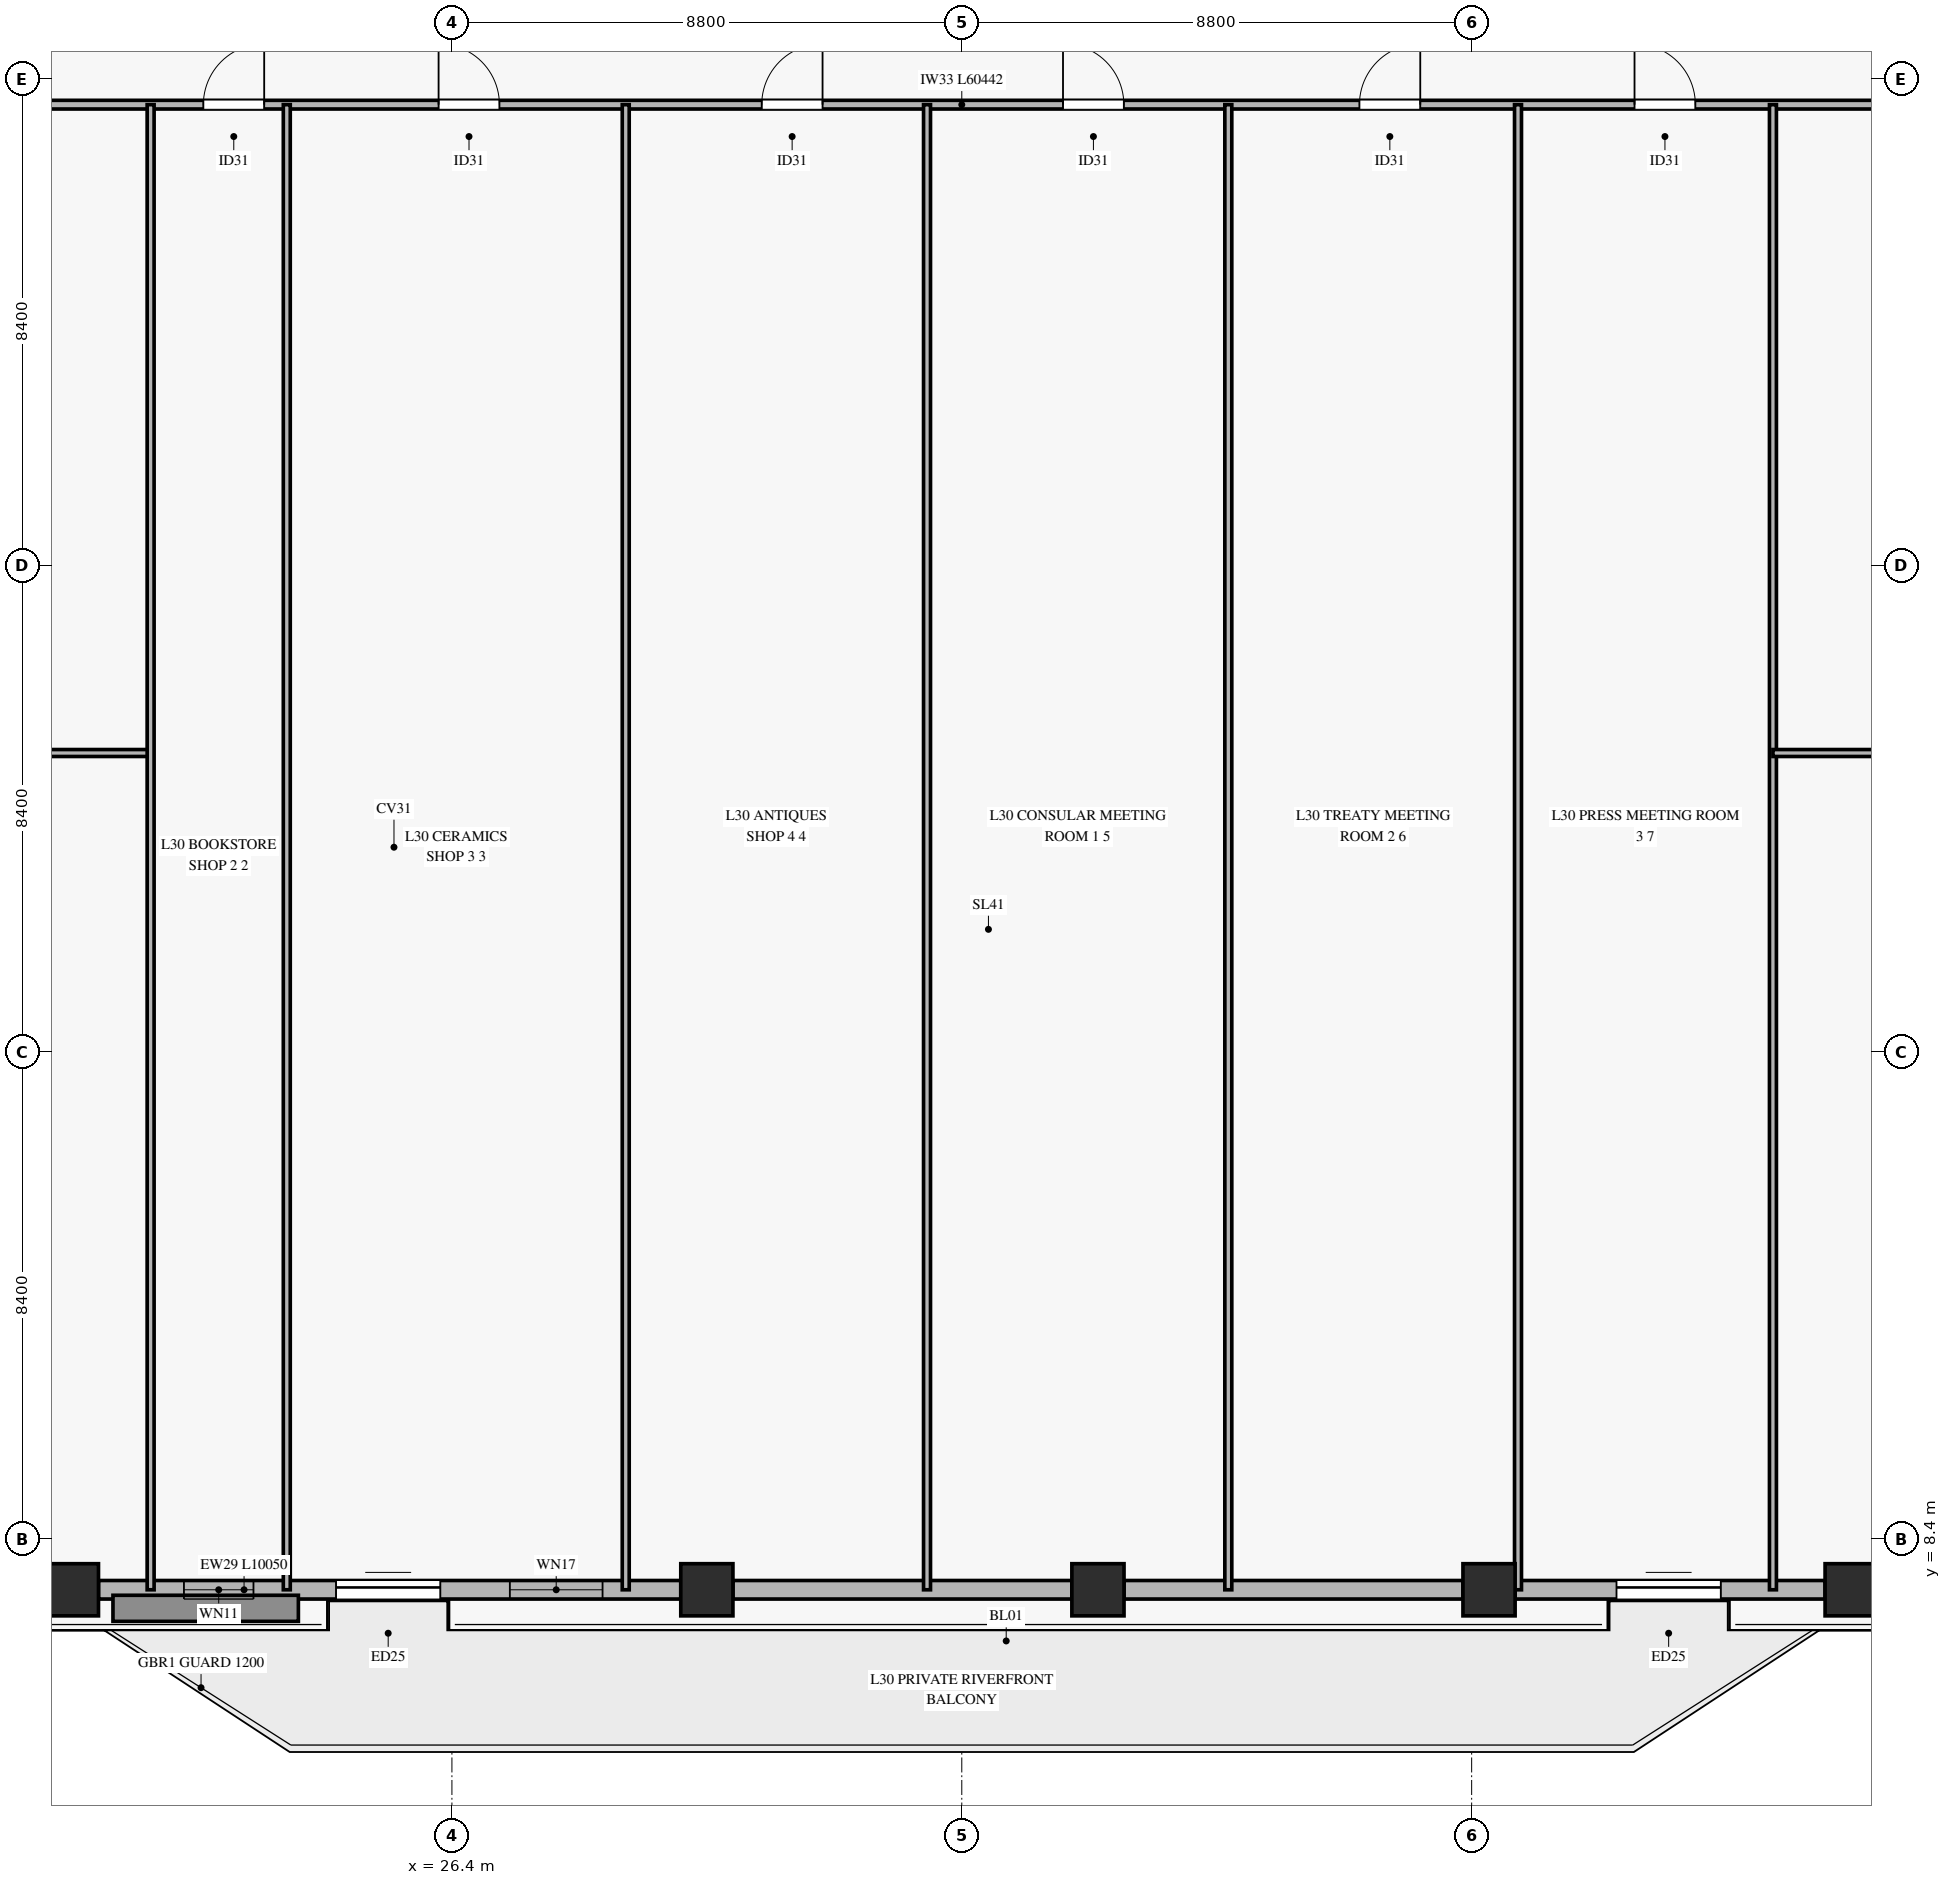
"""IFC4 building model, lengths in metres.
Left out: names, types, materials, properties, quantities, classifications, styles, units other than length and angle.
Written with IfcOpenShell. Run it as: python <this file> out.ifc"""

import sys

from ifc_helpers import new_model, si_unit, direction, frame, frame_2d, origin, origin_2d, place, context, subcontext, project, spatial, rectangle, hollow_rectangle, extrude, source, transform, mapped, element, fill, save


model = new_model("IFC4")
c1 = context("Model", 3, precision=1e-05, world=origin(), true_north=direction((0.0, 1.0)))
c2 = subcontext(c1, "Body", "Model", "MODEL_VIEW")
j1 = project(units=[si_unit("LENGTHUNIT", "METRE"), si_unit("PLANEANGLEUNIT", "RADIAN")], contexts=[c1])
p1 = place(None, origin())
s1 = spatial("IfcSite", under=j1, at=p1, CompositionType="ELEMENT")
p2 = place(p1, origin())
s2 = spatial("IfcBuilding", under=s1, at=p2, CompositionType="ELEMENT")
p3 = place(p2, frame((0.0, 0.0, 123.1)))
s3 = spatial("IfcBuildingStorey", under=s2, at=p3, CompositionType="ELEMENT", Elevation=123.1)
m1 = source(origin(), c2, "Body", "SweptSolid", [
    extrude(hollow_rectangle(XDim=0.9, YDim=0.9, WallThickness=0.04, at=origin_2d()), origin(), (0.0, 0.0, 1.0), 3.68),
])
for number, where, z_axis, x_axis in (
    (1, (19.85, 7.518, 0.0), (0.0, 0.0, 1.0), (1.0, 0.0, 0.0)),
    (2, (30.8, 7.518, 0.0), (0.0, 0.0, 1.0), (1.0, 0.0, 0.0)),
    (3, (37.55, 7.518, 0.0), (0.0, 0.0, 1.0), (1.0, 0.0, 0.0)),
    (4, (44.3, 7.518, 0.0), (0.0, 0.0, 1.0), (1.0, 0.0, 0.0)),
    (5, (50.55, 7.518, 0.0), (0.0, 0.0, 1.0), (1.0, 0.0, 0.0)),
):
    element("IfcColumn", number, at=place(p3, frame(where, z_axis=z_axis, x_axis=x_axis)), inside=s3, PredefinedType="COLUMN", context=c2, shape_type="MappedRepresentation", body=[
        mapped(m1, transform((0.0, 0.0, 0.0), x_axis=(1.0, 0.0, 0.0), y_axis=(0.0, 1.0, 0.0), z_axis=(0.0, 0.0, 1.0), scale=1.0)),
    ])
p4 = place(p3, frame((20.3, 7.518, 0.0), z_axis=(0.0, 0.0, 1.0), x_axis=(1.0, 0.0, 0.0)))
e6 = element("IfcWall", 6, at=p4, inside=s3, PredefinedType="SOLIDWALL", context=c2, shape_type="SweptSolid", body=[
    extrude(rectangle(XDim=10.05, YDim=0.32, at=frame_2d((5.025, 0.0))), origin(), (0.0, 0.0, 1.0), 3.16),
])
p5 = place(p4, frame((4.1, 0.0, 0.0)))
e7 = element("IfcOpeningElement", 7, at=p5, cuts=e6, PredefinedType="OPENING", context=c2, shape_type="SweptSolid", body=[
    extrude(rectangle(XDim=1.8, YDim=2.25, at=frame_2d((0.9, 1.125))), frame((0.0, 0.17, 0.0), z_axis=(0.0, -1.0, 0.0), x_axis=(1.0, 0.0, 0.0)), (0.0, 0.0, 1.0), 0.34),
])
p6 = place(p4, frame((1.475, 0.0, 0.45)))
e8 = element("IfcOpeningElement", 8, at=p6, cuts=e6, PredefinedType="OPENING", context=c2, shape_type="SweptSolid", body=[
    extrude(rectangle(XDim=1.2, YDim=2.0, at=frame_2d((0.6, 1.0))), frame((0.0, 0.17, 0.0), z_axis=(0.0, -1.0, 0.0), x_axis=(1.0, 0.0, 0.0)), (0.0, 0.0, 1.0), 0.34),
])
p7 = place(p4, frame((7.1, 0.0, 0.45)))
e9 = element("IfcOpeningElement", 9, at=p7, cuts=e6, PredefinedType="OPENING", context=c2, shape_type="SweptSolid", body=[
    extrude(rectangle(XDim=1.6, YDim=2.0, at=frame_2d((0.8, 1.0))), frame((0.0, 0.17, 0.0), z_axis=(0.0, -1.0, 0.0), x_axis=(1.0, 0.0, 0.0)), (0.0, 0.0, 1.0), 0.34),
])
for number, where, z_axis, x_axis in (
    (10, (31.25, 7.518, 0.0), (0.0, 0.0, 1.0), (1.0, 0.0, 0.0)),
    (11, (38.0, 7.518, 0.0), (0.0, 0.0, 1.0), (1.0, 0.0, 0.0)),
):
    element("IfcWall", number, at=place(p3, frame(where, z_axis=z_axis, x_axis=x_axis)), inside=s3, PredefinedType="SOLIDWALL", context=c2, shape_type="SweptSolid", body=[
        extrude(rectangle(XDim=5.85, YDim=0.32, at=frame_2d((2.925, 0.0))), origin(), (0.0, 0.0, 1.0), 3.16),
    ])
p8 = place(p3, frame((44.75, 7.518, 0.0), z_axis=(0.0, 0.0, 1.0), x_axis=(1.0, 0.0, 0.0)))
e12 = element("IfcWall", 12, at=p8, inside=s3, PredefinedType="SOLIDWALL", context=c2, shape_type="SweptSolid", body=[
    extrude(rectangle(XDim=5.35, YDim=0.32, at=frame_2d((2.675, 0.0))), origin(), (0.0, 0.0, 1.0), 3.16),
])
p9 = place(p8, frame((1.75, 0.0, 0.0)))
e13 = element("IfcOpeningElement", 13, at=p9, cuts=e12, PredefinedType="OPENING", context=c2, shape_type="SweptSolid", body=[
    extrude(rectangle(XDim=1.8, YDim=2.25, at=frame_2d((0.9, 1.125))), frame((0.0, 0.17, 0.0), z_axis=(0.0, -1.0, 0.0), x_axis=(1.0, 0.0, 0.0)), (0.0, 0.0, 1.0), 0.34),
])
p10 = place(p3, frame((4.979, 33.15, 0.0), z_axis=(0.0, 0.0, 1.0), x_axis=(1.0, 0.0, 0.0)))
e14 = element("IfcWall", 14, at=p10, inside=s3, PredefinedType="PARTITIONING", context=c2, shape_type="SweptSolid", body=[
    extrude(rectangle(XDim=60.442, YDim=0.15, at=frame_2d((30.221, 0.0))), origin(), (0.0, 0.0, 1.0), 2.765),
])
p11 = place(p10, frame((6.774, 0.0, 0.0)))
e15 = element("IfcOpeningElement", 15, at=p11, cuts=e14, PredefinedType="OPENING", context=c2, shape_type="SweptSolid", body=[
    extrude(rectangle(XDim=1.05, YDim=2.15, at=frame_2d((0.525, 1.075))), frame((0.0, 0.085, 0.0), z_axis=(0.0, -1.0, 0.0), x_axis=(1.0, 0.0, 0.0)), (0.0, 0.0, 1.0), 0.17),
])
p12 = place(p10, frame((17.131, 0.0, 0.0)))
e16 = element("IfcOpeningElement", 16, at=p12, cuts=e14, PredefinedType="OPENING", context=c2, shape_type="SweptSolid", body=[
    extrude(rectangle(XDim=1.05, YDim=2.15, at=frame_2d((0.525, 1.075))), frame((0.0, 0.085, 0.0), z_axis=(0.0, -1.0, 0.0), x_axis=(1.0, 0.0, 0.0)), (0.0, 0.0, 1.0), 0.17),
])
p13 = place(p10, frame((21.191, 0.0, 0.0)))
e17 = element("IfcOpeningElement", 17, at=p13, cuts=e14, PredefinedType="OPENING", context=c2, shape_type="SweptSolid", body=[
    extrude(rectangle(XDim=1.05, YDim=2.15, at=frame_2d((0.525, 1.075))), frame((0.0, 0.085, 0.0), z_axis=(0.0, -1.0, 0.0), x_axis=(1.0, 0.0, 0.0)), (0.0, 0.0, 1.0), 0.17),
])
p14 = place(p10, frame((26.768, 0.0, 0.0)))
e18 = element("IfcOpeningElement", 18, at=p14, cuts=e14, PredefinedType="OPENING", context=c2, shape_type="SweptSolid", body=[
    extrude(rectangle(XDim=1.05, YDim=2.15, at=frame_2d((0.525, 1.075))), frame((0.0, 0.085, 0.0), z_axis=(0.0, -1.0, 0.0), x_axis=(1.0, 0.0, 0.0)), (0.0, 0.0, 1.0), 0.17),
])
p15 = place(p10, frame((31.968, 0.0, 0.0)))
e19 = element("IfcOpeningElement", 19, at=p15, cuts=e14, PredefinedType="OPENING", context=c2, shape_type="SweptSolid", body=[
    extrude(rectangle(XDim=1.05, YDim=2.15, at=frame_2d((0.525, 1.075))), frame((0.0, 0.085, 0.0), z_axis=(0.0, -1.0, 0.0), x_axis=(1.0, 0.0, 0.0)), (0.0, 0.0, 1.0), 0.17),
])
p16 = place(p10, frame((37.084, 0.0, 0.0)))
e20 = element("IfcOpeningElement", 20, at=p16, cuts=e14, PredefinedType="OPENING", context=c2, shape_type="SweptSolid", body=[
    extrude(rectangle(XDim=1.05, YDim=2.15, at=frame_2d((0.525, 1.075))), frame((0.0, 0.085, 0.0), z_axis=(0.0, -1.0, 0.0), x_axis=(1.0, 0.0, 0.0)), (0.0, 0.0, 1.0), 0.17),
])
p17 = place(p10, frame((41.832, 0.0, 0.0)))
e21 = element("IfcOpeningElement", 21, at=p17, cuts=e14, PredefinedType="OPENING", context=c2, shape_type="SweptSolid", body=[
    extrude(rectangle(XDim=1.05, YDim=2.15, at=frame_2d((0.525, 1.075))), frame((0.0, 0.085, 0.0), z_axis=(0.0, -1.0, 0.0), x_axis=(1.0, 0.0, 0.0)), (0.0, 0.0, 1.0), 0.17),
])
p18 = place(p10, frame((50.795, 0.0, 0.0)))
e22 = element("IfcOpeningElement", 22, at=p18, cuts=e14, PredefinedType="OPENING", context=c2, shape_type="SweptSolid", body=[
    extrude(rectangle(XDim=1.05, YDim=2.15, at=frame_2d((0.525, 1.075))), frame((0.0, 0.085, 0.0), z_axis=(0.0, -1.0, 0.0), x_axis=(1.0, 0.0, 0.0)), (0.0, 0.0, 1.0), 0.17),
])
p19 = place(p3, frame((4.979, 21.96, 0.0), z_axis=(0.0, 0.0, 1.0), x_axis=(1.0, 0.0, 0.0)))
e23 = element("IfcWall", 23, at=p19, inside=s3, PredefinedType="PARTITIONING", context=c2, shape_type="SweptSolid", body=[
    extrude(rectangle(XDim=16.221, YDim=0.12, at=frame_2d((8.11, 0.0))), origin(), (0.0, 0.0, 1.0), 2.765),
])
p20 = place(p19, frame((7.092, 0.0, 0.0)))
e24 = element("IfcOpeningElement", 24, at=p20, cuts=e23, PredefinedType="OPENING", context=c2, shape_type="SweptSolid", body=[
    extrude(rectangle(XDim=0.95, YDim=2.1, at=frame_2d((0.475, 1.05))), frame((0.0, 0.07, 0.0), z_axis=(0.0, -1.0, 0.0), x_axis=(1.0, 0.0, 0.0)), (0.0, 0.0, 1.0), 0.14),
])
for number, where, z_axis, x_axis in (
    (25, (21.2, 7.518, 0.0), (0.0, 0.0, 1.0), (0.0, 1.0, 0.0)),
    (26, (23.55, 7.518, 0.0), (0.0, 0.0, 1.0), (0.0, 1.0, 0.0)),
    (27, (29.4, 7.518, 0.0), (0.0, 0.0, 1.0), (0.0, 1.0, 0.0)),
    (28, (34.6, 7.518, 0.0), (0.0, 0.0, 1.0), (0.0, 1.0, 0.0)),
    (29, (39.8, 7.518, 0.0), (0.0, 0.0, 1.0), (0.0, 1.0, 0.0)),
    (30, (44.8, 7.518, 0.0), (0.0, 0.0, 1.0), (0.0, 1.0, 0.0)),
    (31, (49.2, 7.518, 0.0), (0.0, 0.0, 1.0), (0.0, 1.0, 0.0)),
):
    element("IfcWall", number, at=place(p3, frame(where, z_axis=z_axis, x_axis=x_axis)), inside=s3, PredefinedType="PARTITIONING", context=c2, shape_type="SweptSolid", body=[
        extrude(rectangle(XDim=25.632, YDim=0.12, at=frame_2d((12.816, 0.0))), origin(), (0.0, 0.0, 1.0), 3.165),
    ])
p21 = place(p3, frame((49.2, 21.96, 0.0), z_axis=(0.0, 0.0, 1.0), x_axis=(1.0, 0.0, 0.0)))
e32 = element("IfcWall", 32, at=p21, inside=s3, PredefinedType="PARTITIONING", context=c2, shape_type="SweptSolid", body=[
    extrude(rectangle(XDim=16.221, YDim=0.12, at=frame_2d((8.11, 0.0))), origin(), (0.0, 0.0, 1.0), 2.765),
])
p22 = place(p21, frame((6.892, 0.0, 0.0)))
e33 = element("IfcOpeningElement", 33, at=p22, cuts=e32, PredefinedType="OPENING", context=c2, shape_type="SweptSolid", body=[
    extrude(rectangle(XDim=0.95, YDim=2.1, at=frame_2d((0.475, 1.05))), frame((0.0, 0.07, 0.0), z_axis=(0.0, -1.0, 0.0), x_axis=(1.0, 0.0, 0.0)), (0.0, 0.0, 1.0), 0.14),
])
m2 = source(origin(), c2, "Body", "SweptSolid", [
    extrude(rectangle(XDim=1.8, YDim=2.25, at=frame_2d((0.9, 1.125))), frame((0.0, 0.025, 0.0), z_axis=(0.0, -1.0, 0.0), x_axis=(1.0, 0.0, 0.0)), (0.0, 0.0, 1.0), 0.05),
])
p23 = place(p5, origin())
e34 = element("IfcDoor", 34, at=p23, inside=s3, OperationType="SLIDING_TO_LEFT", PredefinedType="DOOR", context=c2, shape_type="MappedRepresentation", body=[
    mapped(m2, transform((0.0, 0.0, 0.0), x_axis=(1.0, 0.0, 0.0), y_axis=(0.0, 1.0, 0.0), z_axis=(0.0, 0.0, 1.0), scale=1.0)),
])
fill(e7, e34)
m3 = source(origin(), c2, "Body", "SweptSolid", [
    extrude(rectangle(XDim=1.2, YDim=2.0, at=frame_2d((0.6, 1.0))), frame((0.0, 0.03, 0.0), z_axis=(0.0, -1.0, 0.0), x_axis=(1.0, 0.0, 0.0)), (0.0, 0.0, 1.0), 0.06),
])
p24 = place(p6, origin())
e35 = element("IfcWindow", 35, at=p24, inside=s3, PartitioningType="SINGLE_PANEL", PredefinedType="WINDOW", context=c2, shape_type="MappedRepresentation", body=[
    mapped(m3, transform((0.0, 0.0, 0.0), x_axis=(1.0, 0.0, 0.0), y_axis=(0.0, 1.0, 0.0), z_axis=(0.0, 0.0, 1.0), scale=1.0)),
])
fill(e8, e35)
m4 = source(origin(), c2, "Body", "SweptSolid", [
    extrude(rectangle(XDim=1.6, YDim=2.0, at=frame_2d((0.8, 1.0))), frame((0.0, 0.03, 0.0), z_axis=(0.0, -1.0, 0.0), x_axis=(1.0, 0.0, 0.0)), (0.0, 0.0, 1.0), 0.06),
])
p25 = place(p7, origin())
e36 = element("IfcWindow", 36, at=p25, inside=s3, PartitioningType="SINGLE_PANEL", PredefinedType="WINDOW", context=c2, shape_type="MappedRepresentation", body=[
    mapped(m4, transform((0.0, 0.0, 0.0), x_axis=(1.0, 0.0, 0.0), y_axis=(0.0, 1.0, 0.0), z_axis=(0.0, 0.0, 1.0), scale=1.0)),
])
fill(e9, e36)
p26 = place(p9, origin())
e37 = element("IfcDoor", 37, at=p26, inside=s3, OperationType="SLIDING_TO_LEFT", PredefinedType="DOOR", context=c2, shape_type="MappedRepresentation", body=[
    mapped(m2, transform((0.0, 0.0, 0.0), x_axis=(1.0, 0.0, 0.0), y_axis=(0.0, 1.0, 0.0), z_axis=(0.0, 0.0, 1.0), scale=1.0)),
])
fill(e13, e37)
m5 = source(origin(), c2, "Body", "SweptSolid", [
    extrude(rectangle(XDim=1.05, YDim=2.15, at=frame_2d((0.525, 1.075))), frame((0.0, 0.025, 0.0), z_axis=(0.0, -1.0, 0.0), x_axis=(1.0, 0.0, 0.0)), (0.0, 0.0, 1.0), 0.05),
])
p27 = place(p12, origin())
e38 = element("IfcDoor", 38, at=p27, inside=s3, OperationType="SINGLE_SWING_RIGHT", PredefinedType="DOOR", context=c2, shape_type="MappedRepresentation", body=[
    mapped(m5, transform((0.0, 0.0, 0.0), x_axis=(1.0, 0.0, 0.0), y_axis=(0.0, 1.0, 0.0), z_axis=(0.0, 0.0, 1.0), scale=1.0)),
])
fill(e16, e38)
p28 = place(p13, origin())
e39 = element("IfcDoor", 39, at=p28, inside=s3, OperationType="SINGLE_SWING_LEFT", PredefinedType="DOOR", context=c2, shape_type="MappedRepresentation", body=[
    mapped(m5, transform((0.0, 0.0, 0.0), x_axis=(1.0, 0.0, 0.0), y_axis=(0.0, 1.0, 0.0), z_axis=(0.0, 0.0, 1.0), scale=1.0)),
])
fill(e17, e39)
p29 = place(p14, origin())
e40 = element("IfcDoor", 40, at=p29, inside=s3, OperationType="SINGLE_SWING_RIGHT", PredefinedType="DOOR", context=c2, shape_type="MappedRepresentation", body=[
    mapped(m5, transform((0.0, 0.0, 0.0), x_axis=(1.0, 0.0, 0.0), y_axis=(0.0, 1.0, 0.0), z_axis=(0.0, 0.0, 1.0), scale=1.0)),
])
fill(e18, e40)
p30 = place(p15, origin())
e41 = element("IfcDoor", 41, at=p30, inside=s3, OperationType="SINGLE_SWING_LEFT", PredefinedType="DOOR", context=c2, shape_type="MappedRepresentation", body=[
    mapped(m5, transform((0.0, 0.0, 0.0), x_axis=(1.0, 0.0, 0.0), y_axis=(0.0, 1.0, 0.0), z_axis=(0.0, 0.0, 1.0), scale=1.0)),
])
fill(e19, e41)
p31 = place(p16, origin())
e42 = element("IfcDoor", 42, at=p31, inside=s3, OperationType="SINGLE_SWING_RIGHT", PredefinedType="DOOR", context=c2, shape_type="MappedRepresentation", body=[
    mapped(m5, transform((0.0, 0.0, 0.0), x_axis=(1.0, 0.0, 0.0), y_axis=(0.0, 1.0, 0.0), z_axis=(0.0, 0.0, 1.0), scale=1.0)),
])
fill(e20, e42)
p32 = place(p17, origin())
e43 = element("IfcDoor", 43, at=p32, inside=s3, OperationType="SINGLE_SWING_LEFT", PredefinedType="DOOR", context=c2, shape_type="MappedRepresentation", body=[
    mapped(m5, transform((0.0, 0.0, 0.0), x_axis=(1.0, 0.0, 0.0), y_axis=(0.0, 1.0, 0.0), z_axis=(0.0, 0.0, 1.0), scale=1.0)),
])
fill(e21, e43)
save(model, sys.argv[1])
